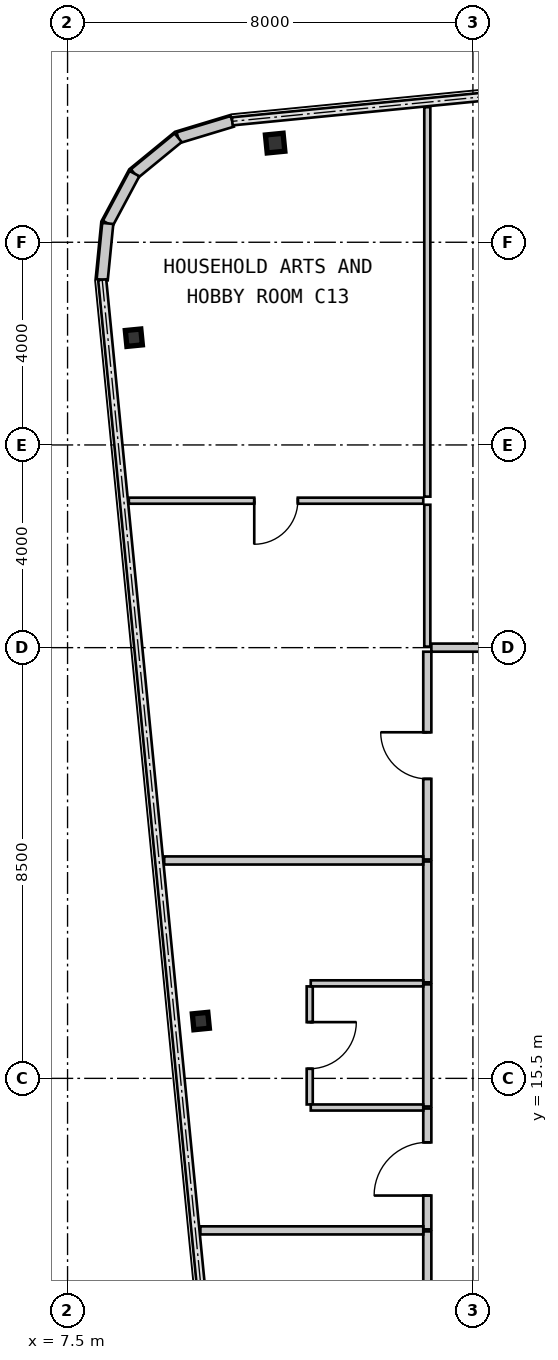
"""IFC4 building model, lengths in metres.
Left out: names, types, materials, properties, quantities, classifications, styles, units other than length and angle.
Written with IfcOpenShell. Run it as: python <this file> out.ifc"""

import sys

from ifc_helpers import new_model, si_unit, direction, frame, frame_2d, origin, origin_2d, place, context, subcontext, project, spatial, rectangle, i_section, extrude, source, transform, mapped, element, fill, save


model = new_model("IFC4")
c1 = context("Model", 3, precision=1e-05, world=origin(), true_north=direction((0.0, 1.0)))
c2 = subcontext(c1, "Body", "Model", "MODEL_VIEW")
j1 = project(units=[si_unit("LENGTHUNIT", "METRE"), si_unit("PLANEANGLEUNIT", "RADIAN")], contexts=[c1])
p1 = place(None, origin())
s1 = spatial("IfcSite", under=j1, at=p1, CompositionType="ELEMENT")
p2 = place(p1, origin())
s2 = spatial("IfcBuilding", under=s1, at=p2, CompositionType="ELEMENT")
p3 = place(p2, frame((0.0, 0.0, 99.75)))
s3 = spatial("IfcBuildingStorey", under=s2, at=p3, CompositionType="ELEMENT", Elevation=99.75)
m1 = source(origin(), c2, "Body", "SweptSolid", [
    extrude(i_section(OverallWidth=0.35, OverallDepth=0.356, WebThickness=0.018, FlangeThickness=0.028, at=origin_2d()), origin(), (0.0, 0.0, 1.0), 3.15),
])
p4 = place(p3, frame((11.597, 33.957, 0.0), z_axis=(0.0, 0.0, 1.0), x_axis=(0.995227399982, 0.097582899759, 0.0)))
e1 = element("IfcColumn", 1, at=p4, inside=s3, PredefinedType="COLUMN", context=c2, shape_type="MappedRepresentation", body=[
    mapped(m1, transform((0.0, 0.0, 0.0), scale=1.0)),
])
m2 = source(origin(), c2, "Body", "SweptSolid", [
    extrude(i_section(OverallWidth=0.307, OverallDepth=0.315, WebThickness=0.012, FlangeThickness=0.019, at=origin_2d()), origin(), (0.0, 0.0, 1.0), 3.15),
])
for number, where, z_axis, x_axis in (
    (2, (10.131, 16.631, 0.0), (0.0, 0.0, 1.0), (0.995, 0.098, 0.0)),
    (3, (8.808, 30.116, 0.0), (0.0, 0.0, 1.0), (0.995, 0.098, 0.0)),
):
    element("IfcColumn", number, at=place(p3, frame(where, z_axis=z_axis, x_axis=x_axis)), inside=s3, PredefinedType="COLUMN", context=c2, shape_type="MappedRepresentation", body=[
        mapped(m2, transform((0.0, 0.0, 0.0), scale=1.0)),
    ])
m3 = source(origin(), c2, "Body", "SweptSolid", [
    extrude(rectangle(XDim=1.116, YDim=0.22, at=frame_2d((0.558, 0.0))), origin(), (0.0, 0.0, 1.0), 2.93),
])
p5 = place(p3, frame((10.751, 34.386, 0.0), z_axis=(0.0, 0.0, 1.0), x_axis=(-0.957070388811, -0.289855603468, 0.0)))
e4 = element("IfcWall", 4, at=p5, inside=s3, PredefinedType="SOLIDWALL", context=c2, shape_type="MappedRepresentation", body=[
    mapped(m3, transform((0.0, 0.0, 0.0), scale=1.0)),
])
m4 = source(origin(), c2, "Body", "SweptSolid", [
    extrude(rectangle(XDim=1.116, YDim=0.22, at=frame_2d((0.558, 0.0))), origin(), (0.0, 0.0, 1.0), 2.93),
])
p6 = place(p3, frame((9.683, 34.063, 0.0), z_axis=(0.0, 0.0, 1.0), x_axis=(-0.773254916409, -0.634095287989, 0.0)))
e5 = element("IfcWall", 5, at=p6, inside=s3, PredefinedType="SOLIDWALL", context=c2, shape_type="MappedRepresentation", body=[
    mapped(m4, transform((0.0, 0.0, 0.0), scale=1.0)),
])
m5 = source(origin(), c2, "Body", "SweptSolid", [
    extrude(rectangle(XDim=1.116, YDim=0.22, at=frame_2d((0.558, 0.0))), origin(), (0.0, 0.0, 1.0), 2.93),
])
p7 = place(p3, frame((8.82, 33.355, 0.0), z_axis=(0.0, 0.0, 1.0), x_axis=(-0.471802540493, -0.881704237704, 0.0)))
e6 = element("IfcWall", 6, at=p7, inside=s3, PredefinedType="SOLIDWALL", context=c2, shape_type="MappedRepresentation", body=[
    mapped(m5, transform((0.0, 0.0, 0.0), scale=1.0)),
])
p8 = place(p3, frame((8.293, 32.371, 0.0), z_axis=(0.0, 0.0, 1.0), x_axis=(-0.098463783145, -0.99514063499, 0.0)))
e7 = element("IfcWall", 7, at=p8, inside=s3, PredefinedType="SOLIDWALL", context=c2, shape_type="MappedRepresentation", body=[
    mapped(m4, transform((0.0, 0.0, 0.0), scale=1.0)),
])
m6 = source(origin(), c2, "Body", "SweptSolid", [
    extrude(rectangle(XDim=1.04, YDim=0.16, at=frame_2d((0.52, 0.0))), origin(), (0.0, 0.0, 1.0), 2.93),
])
p9 = place(p3, frame((14.6, 11.44, 0.0), z_axis=(0.0, 0.0, 1.0), x_axis=(0.0, 1.0, 0.0)))
e8 = element("IfcWall", 8, at=p9, inside=s3, PredefinedType="PARTITIONING", context=c2, shape_type="MappedRepresentation", body=[
    mapped(m6, transform((0.0, 0.0, 0.0), scale=1.0)),
])
m7 = source(origin(), c2, "Body", "SweptSolid", [
    extrude(rectangle(XDim=2.385, YDim=0.16, at=frame_2d((1.192, 0.0))), origin(), (0.0, 0.0, 1.0), 2.93),
])
p10 = place(p3, frame((14.6, 12.52, 0.0), z_axis=(0.0, 0.0, 1.0), x_axis=(0.0, 1.0, 0.0)))
e9 = element("IfcWall", 9, at=p10, inside=s3, PredefinedType="PARTITIONING", context=c2, shape_type="MappedRepresentation", body=[
    mapped(m7, transform((0.0, 0.0, 0.0), scale=1.0)),
])
m8 = source(origin(), c2, "Body", "SweptSolid", [
    extrude(rectangle(XDim=1.05, YDim=2.1, at=frame_2d((0.525, 1.05))), frame((0.0, 0.09, 0.0), z_axis=(0.0, -1.0, 0.0), x_axis=(1.0, 0.0, 0.0)), (0.0, 0.0, 1.0), 0.18),
])
p11 = place(p10, frame((0.667, 0.0, 0.0)))
e10 = element("IfcOpeningElement", 10, at=p11, cuts=e9, PredefinedType="OPENING", context=c2, shape_type="MappedRepresentation", body=[
    mapped(m8, transform((0.0, 0.0, 0.0), scale=1.0)),
])
p12 = place(p3, frame((14.6, 17.395, 0.0), z_axis=(0.0, 0.0, 1.0), x_axis=(0.0, 1.0, 0.0)))
e11 = element("IfcWall", 11, at=p12, inside=s3, PredefinedType="PARTITIONING", context=c2, shape_type="MappedRepresentation", body=[
    mapped(m7, transform((0.0, 0.0, 0.0), scale=1.0)),
])
m9 = source(origin(), c2, "Body", "SweptSolid", [
    extrude(rectangle(XDim=2.409, YDim=0.16, at=frame_2d((1.205, 0.0))), origin(), (0.0, 0.0, 1.0), 2.93),
])
p13 = place(p3, frame((14.6, 14.945, 0.0), z_axis=(0.0, 0.0, 1.0), x_axis=(0.0, 1.0, 0.0)))
e12 = element("IfcWall", 12, at=p13, inside=s3, PredefinedType="PARTITIONING", context=c2, shape_type="MappedRepresentation", body=[
    mapped(m9, transform((0.0, 0.0, 0.0), scale=1.0)),
])
m10 = source(origin(), c2, "Body", "SweptSolid", [
    extrude(rectangle(XDim=4.1, YDim=0.16, at=frame_2d((2.05, 0.0))), origin(), (0.0, 0.0, 1.0), 2.93),
])
p14 = place(p3, frame((14.6, 19.82, 0.0), z_axis=(0.0, 0.0, 1.0), x_axis=(0.0, 1.0, 0.0)))
e13 = element("IfcWall", 13, at=p14, inside=s3, PredefinedType="PARTITIONING", context=c2, shape_type="MappedRepresentation", body=[
    mapped(m10, transform((0.0, 0.0, 0.0), scale=1.0)),
])
m11 = source(origin(), c2, "Body", "SweptSolid", [
    extrude(rectangle(XDim=0.92, YDim=2.1, at=frame_2d((0.46, 1.05))), frame((0.0, 0.09, 0.0), z_axis=(0.0, -1.0, 0.0), x_axis=(1.0, 0.0, 0.0)), (0.0, 0.0, 1.0), 0.18),
])
p15 = place(p14, frame((1.59, 0.0, 0.0)))
e14 = element("IfcOpeningElement", 14, at=p15, cuts=e13, PredefinedType="OPENING", context=c2, shape_type="MappedRepresentation", body=[
    mapped(m11, transform((0.0, 0.0, 0.0), scale=1.0)),
])
m12 = source(origin(), c2, "Body", "SweptSolid", [
    extrude(rectangle(XDim=4.17, YDim=0.16, at=frame_2d((2.085, 0.0))), origin(), (0.0, 0.0, 1.0), 2.93),
])
p16 = place(p3, frame((14.68, 24.0, 0.0), z_axis=(0.0, 0.0, 1.0), x_axis=(1.0, 0.0, 0.0)))
e15 = element("IfcWall", 15, at=p16, inside=s3, PredefinedType="PARTITIONING", context=c2, shape_type="MappedRepresentation", body=[
    mapped(m12, transform((0.0, 0.0, 0.0), scale=1.0)),
])
p17 = place(p16, frame((1.69, 0.0, 0.0)))
e16 = element("IfcOpeningElement", 16, at=p17, cuts=e15, PredefinedType="OPENING", context=c2, shape_type="MappedRepresentation", body=[
    mapped(m11, transform((0.0, 0.0, 0.0), scale=1.0)),
])
m13 = source(origin(), c2, "Body", "SweptSolid", [
    extrude(rectangle(XDim=4.399, YDim=0.16, at=frame_2d((2.199, 0.0))), origin(), (0.0, 0.0, 1.0), 2.93),
])
p18 = place(p3, frame((10.121, 12.5, 0.0), z_axis=(0.0, 0.0, 1.0), x_axis=(1.0, 0.0, 0.0)))
e17 = element("IfcWall", 17, at=p18, inside=s3, PredefinedType="PARTITIONING", context=c2, shape_type="MappedRepresentation", body=[
    mapped(m13, transform((0.0, 0.0, 0.0), scale=1.0)),
])
m14 = source(origin(), c2, "Body", "SweptSolid", [
    extrude(rectangle(XDim=2.33, YDim=0.12, at=frame_2d((1.165, 0.0))), origin(), (0.0, 0.0, 1.0), 2.93),
])
p19 = place(p3, frame((12.279, 17.315, 0.0), z_axis=(0.0, 0.0, 1.0), x_axis=(0.0, -1.0, 0.0)))
e18 = element("IfcWall", 18, at=p19, inside=s3, PredefinedType="PARTITIONING", context=c2, shape_type="MappedRepresentation", body=[
    mapped(m14, transform((0.0, 0.0, 0.0), scale=1.0)),
])
m15 = source(origin(), c2, "Body", "SweptSolid", [
    extrude(rectangle(XDim=0.92, YDim=2.1, at=frame_2d((0.46, 1.05))), frame((0.0, 0.07, 0.0), z_axis=(0.0, -1.0, 0.0), x_axis=(1.0, 0.0, 0.0)), (0.0, 0.0, 1.0), 0.14),
])
p20 = place(p19, frame((0.705, 0.0, 0.0)))
e19 = element("IfcOpeningElement", 19, at=p20, cuts=e18, PredefinedType="OPENING", context=c2, shape_type="MappedRepresentation", body=[
    mapped(m15, transform((0.0, 0.0, 0.0), scale=1.0)),
])
m16 = source(origin(), c2, "Body", "SweptSolid", [
    extrude(rectangle(XDim=2.221, YDim=0.12, at=frame_2d((1.11, 0.0))), origin(), (0.0, 0.0, 1.0), 2.93),
])
for number, where, z_axis, x_axis in (
    (20, (14.52, 17.375, 0.0), (0.0, 0.0, 1.0), (-1.0, 0.0, 0.0)),
    (21, (12.299, 14.925, 0.0), (0.0, 0.0, 1.0), (1.0, 0.0, 0.0)),
):
    element("IfcWall", number, at=place(p3, frame(where, z_axis=z_axis, x_axis=x_axis)), inside=s3, PredefinedType="PARTITIONING", context=c2, shape_type="MappedRepresentation", body=[
        mapped(m16, transform((0.0, 0.0, 0.0), scale=1.0)),
    ])
m17 = source(origin(), c2, "Body", "SweptSolid", [
    extrude(rectangle(XDim=5.11, YDim=0.16, at=frame_2d((2.555, 0.0))), origin(), (0.0, 0.0, 1.0), 2.93),
])
p21 = place(p3, frame((9.408, 19.8, 0.0), z_axis=(0.0, 0.0, 1.0), x_axis=(1.0, 0.0, 0.0)))
e22 = element("IfcWall", 22, at=p21, inside=s3, PredefinedType="PARTITIONING", context=c2, shape_type="MappedRepresentation", body=[
    mapped(m17, transform((0.0, 0.0, 0.0), scale=1.0)),
])
m18 = source(origin(), c2, "Body", "SweptSolid", [
    extrude(rectangle(XDim=5.811, YDim=0.12, at=frame_2d((2.905, 0.0))), origin(), (0.0, 0.0, 1.0), 2.93),
])
p22 = place(p3, frame((8.709, 26.9, 0.0), z_axis=(0.0, 0.0, 1.0), x_axis=(1.0, 0.0, 0.0)))
e23 = element("IfcWall", 23, at=p22, inside=s3, PredefinedType="PARTITIONING", context=c2, shape_type="MappedRepresentation", body=[
    mapped(m18, transform((0.0, 0.0, 0.0), scale=1.0)),
])
m19 = source(origin(), c2, "Body", "SweptSolid", [
    extrude(rectangle(XDim=0.86, YDim=2.1, at=frame_2d((0.43, 1.05))), frame((0.0, 0.07, 0.0), z_axis=(0.0, -1.0, 0.0), x_axis=(1.0, 0.0, 0.0)), (0.0, 0.0, 1.0), 0.14),
])
p23 = place(p22, frame((2.475, 0.0, 0.0)))
e24 = element("IfcOpeningElement", 24, at=p23, cuts=e23, PredefinedType="OPENING", context=c2, shape_type="MappedRepresentation", body=[
    mapped(m19, transform((0.0, 0.0, 0.0), scale=1.0)),
])
m20 = source(origin(), c2, "Body", "SweptSolid", [
    extrude(rectangle(XDim=2.8, YDim=0.12, at=frame_2d((1.4, 0.0))), origin(), (0.0, 0.0, 1.0), 2.93),
])
p24 = place(p3, frame((14.6, 26.82, 0.0), z_axis=(0.0, 0.0, 1.0), x_axis=(0.0, -1.0, 0.0)))
e25 = element("IfcWall", 25, at=p24, inside=s3, PredefinedType="PARTITIONING", context=c2, shape_type="MappedRepresentation", body=[
    mapped(m20, transform((0.0, 0.0, 0.0), scale=1.0)),
])
m21 = source(origin(), c2, "Body", "SweptSolid", [
    extrude(rectangle(XDim=7.686, YDim=0.12, at=frame_2d((3.843, 0.0))), origin(), (0.0, 0.0, 1.0), 2.93),
])
p25 = place(p3, frame((14.6, 34.666, 0.0), z_axis=(0.0, 0.0, 1.0), x_axis=(0.0, -1.0, 0.0)))
e26 = element("IfcWall", 26, at=p25, inside=s3, PredefinedType="PARTITIONING", context=c2, shape_type="MappedRepresentation", body=[
    mapped(m21, transform((0.0, 0.0, 0.0), scale=1.0)),
])
m22 = source(origin(), c2, "Body", "SweptSolid", [
    extrude(rectangle(XDim=1.05, YDim=2.1, at=frame_2d((0.525, 1.05))), frame((0.0, 0.025, 0.0), z_axis=(0.0, -1.0, 0.0), x_axis=(1.0, 0.0, 0.0)), (0.0, 0.0, 1.0), 0.05),
])
p26 = place(p11, origin())
e27 = element("IfcDoor", 27, at=p26, inside=s3, OperationType="SINGLE_SWING_LEFT", PredefinedType="DOOR", context=c2, shape_type="MappedRepresentation", body=[
    mapped(m22, transform((0.0, 0.0, 0.0), scale=1.0)),
])
fill(e10, e27)
m23 = source(origin(), c2, "Body", "SweptSolid", [
    extrude(rectangle(XDim=0.92, YDim=2.1, at=frame_2d((0.46, 1.05))), frame((0.0, 0.025, 0.0), z_axis=(0.0, -1.0, 0.0), x_axis=(1.0, 0.0, 0.0)), (0.0, 0.0, 1.0), 0.05),
])
p27 = place(p15, origin())
e28 = element("IfcDoor", 28, at=p27, inside=s3, OperationType="SINGLE_SWING_RIGHT", PredefinedType="DOOR", context=c2, shape_type="MappedRepresentation", body=[
    mapped(m23, transform((0.0, 0.0, 0.0), scale=1.0)),
])
fill(e14, e28)
p28 = place(p20, origin())
e29 = element("IfcDoor", 29, at=p28, inside=s3, OperationType="SINGLE_SWING_LEFT", PredefinedType="DOOR", context=c2, shape_type="MappedRepresentation", body=[
    mapped(m23, transform((0.0, 0.0, 0.0), scale=1.0)),
])
fill(e19, e29)
m24 = source(origin(), c2, "Body", "SweptSolid", [
    extrude(rectangle(XDim=0.86, YDim=2.1, at=frame_2d((0.43, 1.05))), frame((0.0, 0.025, 0.0), z_axis=(0.0, -1.0, 0.0), x_axis=(1.0, 0.0, 0.0)), (0.0, 0.0, 1.0), 0.05),
])
p29 = place(p23, frame((0.86, 0.0, 0.0), z_axis=(0.0, 0.0, 1.0), x_axis=(-1.0, 0.0, 0.0)))
e30 = element("IfcDoor", 30, at=p29, inside=s3, OperationType="SINGLE_SWING_RIGHT", PredefinedType="DOOR", context=c2, shape_type="MappedRepresentation", body=[
    mapped(m24, transform((0.0, 0.0, 0.0), scale=1.0)),
])
fill(e24, e30)
save(model, sys.argv[1])
